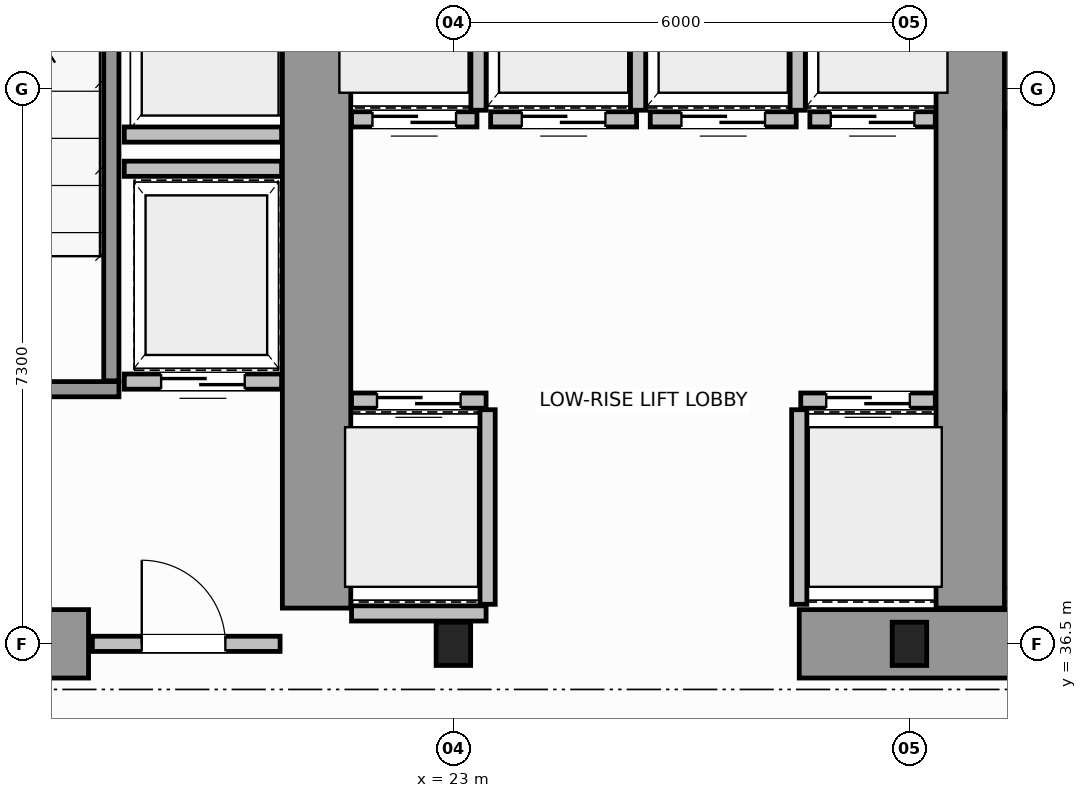
"""IFC4 building model, lengths in metres.
Left out: names, types, materials, properties, quantities, classifications, styles, units other than length and angle.
Written with IfcOpenShell. Run it as: python <this file> out.ifc"""

import sys

from ifc_helpers import new_model, si_unit, direction, frame, frame_2d, origin, origin_2d, place, context, subcontext, project, spatial, rectangle, i_section, extrude, source, transform, mapped, element, fill, save


model = new_model("IFC4")
c1 = context("Model", 3, precision=1e-05, world=origin(), true_north=direction((0.0, 1.0)))
c2 = subcontext(c1, "Body", "Model", "MODEL_VIEW")
j1 = project(units=[si_unit("LENGTHUNIT", "METRE"), si_unit("PLANEANGLEUNIT", "RADIAN")], contexts=[c1])
p1 = place(None, origin())
s1 = spatial("IfcSite", under=j1, at=p1, CompositionType="ELEMENT")
p2 = place(p1, origin())
s2 = spatial("IfcBuilding", under=s1, at=p2, CompositionType="ELEMENT")
p3 = place(p2, frame((0.0, 0.0, 56.8)))
s3 = spatial("IfcBuildingStorey", under=s2, at=p3, CompositionType="ELEMENT", Elevation=56.8)
m1 = source(origin(), c2, "Body", "SweptSolid", [
    extrude(i_section(OverallWidth=0.454, OverallDepth=0.569, WebThickness=0.078, FlangeThickness=0.08, FilletRadius=0.015, at=origin_2d()), origin(), (0.0, 0.0, 1.0), 3.8),
])
for number, where, z_axis, x_axis in (
    (1, (23.0, 36.5, 0.0), (0.0, 0.0, 1.0), (1.0, 0.0, 0.0)),
    (2, (29.0, 36.5, 0.0), (0.0, 0.0, 1.0), (1.0, 0.0, 0.0)),
):
    element("IfcColumn", number, at=place(p3, frame(where, z_axis=z_axis, x_axis=x_axis)), inside=s3, PredefinedType="COLUMN", context=c2, shape_type="MappedRepresentation", body=[
        mapped(m1, transform((0.0, 0.0, 0.0), scale=1.0)),
    ])
p4 = place(p3, frame((14.47, 36.5, 0.0), z_axis=(0.0, 0.0, 1.0), x_axis=(1.0, 0.0, 0.0)))
e3 = element("IfcWall", 3, at=p4, inside=s3, PredefinedType="SHEAR", context=c2, shape_type="SweptSolid", body=[
    extrude(rectangle(XDim=3.73, YDim=0.9, at=frame_2d((1.865, 0.0))), origin(), (0.0, 0.0, 1.0), 2.38),
])
p5 = place(p3, frame((27.55, 36.5, 0.0), z_axis=(0.0, 0.0, 1.0), x_axis=(1.0, 0.0, 0.0)))
e4 = element("IfcWall", 4, at=p5, inside=s3, PredefinedType="SHEAR", context=c2, shape_type="SweptSolid", body=[
    extrude(rectangle(XDim=4.5, YDim=0.9, at=frame_2d((2.25, 0.0))), origin(), (0.0, 0.0, 1.0), 3.8),
])
for number, where, z_axis, x_axis in (
    (5, (21.2, 36.97, 0.0), (0.0, 0.0, 1.0), (0.0, 1.0, 0.0)),
    (6, (29.8, 36.97, 0.0), (0.0, 0.0, 1.0), (0.0, 1.0, 0.0)),
):
    element("IfcWall", number, at=place(p3, frame(where, z_axis=z_axis, x_axis=x_axis)), inside=s3, PredefinedType="SHEAR", context=c2, shape_type="SweptSolid", body=[
        extrude(rectangle(XDim=9.23, YDim=0.9, at=frame_2d((4.615, 0.0))), origin(), (0.0, 0.0, 1.0), 3.8),
    ])
p6 = place(p3, frame((14.45, 39.85, 0.0), z_axis=(0.0, 0.0, 1.0), x_axis=(1.0, 0.0, 0.0)))
e7 = element("IfcWall", 7, at=p6, inside=s3, PredefinedType="SOLIDWALL", context=c2, shape_type="SweptSolid", body=[
    extrude(rectangle(XDim=4.15, YDim=0.2, at=frame_2d((2.075, 0.0))), origin(), (0.0, 0.0, 1.0), 3.8),
])
p7 = place(p6, frame((1.725, 0.0, 0.0)))
e8 = element("IfcOpeningElement", 8, at=p7, cuts=e7, PredefinedType="OPENING", context=c2, shape_type="SweptSolid", body=[
    extrude(rectangle(XDim=1.1, YDim=2.15, at=frame_2d((0.55, 1.075))), frame((0.0, 0.11, 0.0), z_axis=(0.0, -1.0, 0.0), x_axis=(1.0, 0.0, 0.0)), (0.0, 0.0, 1.0), 0.22),
])
p8 = place(p3, frame((18.5, 39.96, 0.0), z_axis=(0.0, 0.0, 1.0), x_axis=(0.0, 1.0, 0.0)))
e9 = element("IfcWall", 9, at=p8, inside=s3, PredefinedType="SOLIDWALL", context=c2, shape_type="SweptSolid", body=[
    extrude(rectangle(XDim=9.93, YDim=0.2, at=frame_2d((4.965, 0.0))), origin(), (0.0, 0.0, 1.0), 3.8),
])
p9 = place(p3, frame((18.25, 36.5, 0.0), z_axis=(0.0, 0.0, 1.0), x_axis=(1.0, 0.0, 0.0)))
e10 = element("IfcWall", 10, at=p9, inside=s3, PredefinedType="SOLIDWALL", context=c2, shape_type="SweptSolid", body=[
    extrude(rectangle(XDim=2.47, YDim=0.2, at=frame_2d((1.235, 0.0))), origin(), (0.0, 0.0, 1.0), 2.37),
])
p10 = place(p9, frame((0.65, 0.0, 0.0)))
e11 = element("IfcOpeningElement", 11, at=p10, cuts=e10, PredefinedType="OPENING", context=c2, shape_type="SweptSolid", body=[
    extrude(rectangle(XDim=1.1, YDim=2.15, at=frame_2d((0.55, 1.075))), frame((0.0, 0.11, 0.0), z_axis=(0.0, -1.0, 0.0), x_axis=(1.0, 0.0, 0.0)), (0.0, 0.0, 1.0), 0.22),
])
p11 = place(p3, frame((21.66, 39.7, 0.0), z_axis=(0.0, 0.0, 1.0), x_axis=(1.0, 0.0, 0.0)))
e12 = element("IfcWall", 12, at=p11, inside=s3, PredefinedType="SOLIDWALL", context=c2, shape_type="SweptSolid", body=[
    extrude(rectangle(XDim=1.77, YDim=0.2, at=frame_2d((0.885, 0.0))), origin(), (0.0, 0.0, 1.0), 3.58),
])
p12 = place(p11, frame((0.335, 0.0, 0.0)))
e13 = element("IfcOpeningElement", 13, at=p12, cuts=e12, PredefinedType="OPENING", context=c2, shape_type="SweptSolid", body=[
    extrude(rectangle(XDim=1.1, YDim=2.15, at=frame_2d((0.55, 1.075))), frame((0.0, 0.11, 0.0), z_axis=(0.0, -1.0, 0.0), x_axis=(1.0, 0.0, 0.0)), (0.0, 0.0, 1.0), 0.22),
])
p13 = place(p3, frame((21.66, 36.9, 0.0), z_axis=(0.0, 0.0, 1.0), x_axis=(1.0, 0.0, 0.0)))
e14 = element("IfcWall", 14, at=p13, inside=s3, PredefinedType="SOLIDWALL", context=c2, shape_type="SweptSolid", body=[
    extrude(rectangle(XDim=1.77, YDim=0.2, at=frame_2d((0.885, 0.0))), origin(), (0.0, 0.0, 1.0), 2.37),
])
p14 = place(p3, frame((23.45, 37.02, 0.0), z_axis=(0.0, 0.0, 1.0), x_axis=(0.0, 1.0, 0.0)))
e15 = element("IfcWall", 15, at=p14, inside=s3, PredefinedType="SOLIDWALL", context=c2, shape_type="SweptSolid", body=[
    extrude(rectangle(XDim=2.56, YDim=0.2, at=frame_2d((1.28, 0.0))), origin(), (0.0, 0.0, 1.0), 3.58),
])
p15 = place(p3, frame((27.57, 39.7, 0.0), z_axis=(0.0, 0.0, 1.0), x_axis=(1.0, 0.0, 0.0)))
e16 = element("IfcWall", 16, at=p15, inside=s3, PredefinedType="SOLIDWALL", context=c2, shape_type="SweptSolid", body=[
    extrude(rectangle(XDim=1.77, YDim=0.2, at=frame_2d((0.885, 0.0))), origin(), (0.0, 0.0, 1.0), 3.58),
])
p16 = place(p15, frame((0.335, 0.0, 0.0)))
e17 = element("IfcOpeningElement", 17, at=p16, cuts=e16, PredefinedType="OPENING", context=c2, shape_type="SweptSolid", body=[
    extrude(rectangle(XDim=1.1, YDim=2.15, at=frame_2d((0.55, 1.075))), frame((0.0, 0.11, 0.0), z_axis=(0.0, -1.0, 0.0), x_axis=(1.0, 0.0, 0.0)), (0.0, 0.0, 1.0), 0.22),
])
p17 = place(p3, frame((27.55, 37.02, 0.0), z_axis=(0.0, 0.0, 1.0), x_axis=(0.0, 1.0, 0.0)))
e18 = element("IfcWall", 18, at=p17, inside=s3, PredefinedType="SOLIDWALL", context=c2, shape_type="SweptSolid", body=[
    extrude(rectangle(XDim=2.56, YDim=0.2, at=frame_2d((1.28, 0.0))), origin(), (0.0, 0.0, 1.0), 3.58),
])
p18 = place(p3, frame((21.66, 43.4, 0.0), z_axis=(0.0, 0.0, 1.0), x_axis=(1.0, 0.0, 0.0)))
e19 = element("IfcWall", 19, at=p18, inside=s3, PredefinedType="SOLIDWALL", context=c2, shape_type="SweptSolid", body=[
    extrude(rectangle(XDim=1.65, YDim=0.2, at=frame_2d((0.825, 0.0))), origin(), (0.0, 0.0, 1.0), 3.58),
])
p19 = place(p18, frame((0.275, 0.0, 0.0)))
e20 = element("IfcOpeningElement", 20, at=p19, cuts=e19, PredefinedType="OPENING", context=c2, shape_type="SweptSolid", body=[
    extrude(rectangle(XDim=1.1, YDim=2.15, at=frame_2d((0.55, 1.075))), frame((0.0, 0.11, 0.0), z_axis=(0.0, -1.0, 0.0), x_axis=(1.0, 0.0, 0.0)), (0.0, 0.0, 1.0), 0.22),
])
p20 = place(p3, frame((23.33, 43.52, 0.0), z_axis=(0.0, 0.0, 1.0), x_axis=(0.0, 1.0, 0.0)))
e21 = element("IfcWall", 21, at=p20, inside=s3, PredefinedType="SOLIDWALL", context=c2, shape_type="SweptSolid", body=[
    extrude(rectangle(XDim=2.56, YDim=0.2, at=frame_2d((1.28, 0.0))), origin(), (0.0, 0.0, 1.0), 3.58),
])
p21 = place(p3, frame((23.49, 43.4, 0.0), z_axis=(0.0, 0.0, 1.0), x_axis=(1.0, 0.0, 0.0)))
e22 = element("IfcWall", 22, at=p21, inside=s3, PredefinedType="SOLIDWALL", context=c2, shape_type="SweptSolid", body=[
    extrude(rectangle(XDim=1.92, YDim=0.2, at=frame_2d((0.96, 0.0))), origin(), (0.0, 0.0, 1.0), 3.58),
])
p22 = place(p21, frame((0.41, 0.0, 0.0)))
e23 = element("IfcOpeningElement", 23, at=p22, cuts=e22, PredefinedType="OPENING", context=c2, shape_type="SweptSolid", body=[
    extrude(rectangle(XDim=1.1, YDim=2.15, at=frame_2d((0.55, 1.075))), frame((0.0, 0.11, 0.0), z_axis=(0.0, -1.0, 0.0), x_axis=(1.0, 0.0, 0.0)), (0.0, 0.0, 1.0), 0.22),
])
p23 = place(p3, frame((25.43, 43.52, 0.0), z_axis=(0.0, 0.0, 1.0), x_axis=(0.0, 1.0, 0.0)))
e24 = element("IfcWall", 24, at=p23, inside=s3, PredefinedType="SOLIDWALL", context=c2, shape_type="SweptSolid", body=[
    extrude(rectangle(XDim=2.56, YDim=0.2, at=frame_2d((1.28, 0.0))), origin(), (0.0, 0.0, 1.0), 3.58),
])
p24 = place(p3, frame((25.59, 43.4, 0.0), z_axis=(0.0, 0.0, 1.0), x_axis=(1.0, 0.0, 0.0)))
e25 = element("IfcWall", 25, at=p24, inside=s3, PredefinedType="SOLIDWALL", context=c2, shape_type="SweptSolid", body=[
    extrude(rectangle(XDim=1.92, YDim=0.2, at=frame_2d((0.96, 0.0))), origin(), (0.0, 0.0, 1.0), 3.58),
])
p25 = place(p24, frame((0.41, 0.0, 0.0)))
e26 = element("IfcOpeningElement", 26, at=p25, cuts=e25, PredefinedType="OPENING", context=c2, shape_type="SweptSolid", body=[
    extrude(rectangle(XDim=1.1, YDim=2.15, at=frame_2d((0.55, 1.075))), frame((0.0, 0.11, 0.0), z_axis=(0.0, -1.0, 0.0), x_axis=(1.0, 0.0, 0.0)), (0.0, 0.0, 1.0), 0.22),
])
p26 = place(p3, frame((27.53, 43.52, 0.0), z_axis=(0.0, 0.0, 1.0), x_axis=(0.0, 1.0, 0.0)))
e27 = element("IfcWall", 27, at=p26, inside=s3, PredefinedType="SOLIDWALL", context=c2, shape_type="SweptSolid", body=[
    extrude(rectangle(XDim=2.56, YDim=0.2, at=frame_2d((1.28, 0.0))), origin(), (0.0, 0.0, 1.0), 3.58),
])
p27 = place(p3, frame((27.69, 43.4, 0.0), z_axis=(0.0, 0.0, 1.0), x_axis=(1.0, 0.0, 0.0)))
e28 = element("IfcWall", 28, at=p27, inside=s3, PredefinedType="SOLIDWALL", context=c2, shape_type="SweptSolid", body=[
    extrude(rectangle(XDim=1.65, YDim=0.2, at=frame_2d((0.825, 0.0))), origin(), (0.0, 0.0, 1.0), 3.58),
])
p28 = place(p27, frame((0.275, 0.0, 0.0)))
e29 = element("IfcOpeningElement", 29, at=p28, cuts=e28, PredefinedType="OPENING", context=c2, shape_type="SweptSolid", body=[
    extrude(rectangle(XDim=1.1, YDim=2.15, at=frame_2d((0.55, 1.075))), frame((0.0, 0.11, 0.0), z_axis=(0.0, -1.0, 0.0), x_axis=(1.0, 0.0, 0.0)), (0.0, 0.0, 1.0), 0.22),
])
p29 = place(p3, frame((30.26, 39.7, 0.0), z_axis=(0.0, 0.0, 1.0), x_axis=(1.0, 0.0, 0.0)))
e30 = element("IfcWall", 30, at=p29, inside=s3, PredefinedType="SOLIDWALL", context=c2, shape_type="SweptSolid", body=[
    extrude(rectangle(XDim=1.77, YDim=0.2, at=frame_2d((0.885, 0.0))), origin(), (0.0, 0.0, 1.0), 3.58),
])
p30 = place(p3, frame((30.26, 43.4, 0.0), z_axis=(0.0, 0.0, 1.0), x_axis=(1.0, 0.0, 0.0)))
e31 = element("IfcWall", 31, at=p30, inside=s3, PredefinedType="SOLIDWALL", context=c2, shape_type="SweptSolid", body=[
    extrude(rectangle(XDim=1.65, YDim=0.2, at=frame_2d((0.825, 0.0))), origin(), (0.0, 0.0, 1.0), 3.58),
])
p31 = place(p3, frame((18.67, 43.2, 0.0), z_axis=(0.0, 0.0, 1.0), x_axis=(1.0, 0.0, 0.0)))
e32 = element("IfcWall", 32, at=p31, inside=s3, PredefinedType="SOLIDWALL", context=c2, shape_type="SweptSolid", body=[
    extrude(rectangle(XDim=2.07, YDim=0.2, at=frame_2d((1.035, 0.0))), origin(), (0.0, 0.0, 1.0), 3.58),
])
p32 = place(p3, frame((18.67, 39.95, 0.0), z_axis=(0.0, 0.0, 1.0), x_axis=(1.0, 0.0, 0.0)))
e33 = element("IfcWall", 33, at=p32, inside=s3, PredefinedType="SOLIDWALL", context=c2, shape_type="SweptSolid", body=[
    extrude(rectangle(XDim=2.07, YDim=0.2, at=frame_2d((1.035, 0.0))), origin(), (0.0, 0.0, 1.0), 3.58),
])
p33 = place(p32, frame((0.485, 0.0, 0.0)))
e34 = element("IfcOpeningElement", 34, at=p33, cuts=e33, PredefinedType="OPENING", context=c2, shape_type="SweptSolid", body=[
    extrude(rectangle(XDim=1.1, YDim=2.15, at=frame_2d((0.55, 1.075))), frame((0.0, 0.11, 0.0), z_axis=(0.0, -1.0, 0.0), x_axis=(1.0, 0.0, 0.0)), (0.0, 0.0, 1.0), 0.22),
])
p34 = place(p3, frame((18.67, 42.75, 0.0), z_axis=(0.0, 0.0, 1.0), x_axis=(1.0, 0.0, 0.0)))
e35 = element("IfcWall", 35, at=p34, inside=s3, PredefinedType="SOLIDWALL", context=c2, shape_type="SweptSolid", body=[
    extrude(rectangle(XDim=2.07, YDim=0.2, at=frame_2d((1.035, 0.0))), origin(), (0.0, 0.0, 1.0), 3.58),
])
m2 = source(origin(), c2, "Body", "SweptSolid", [
    extrude(rectangle(XDim=1.1, YDim=2.15, at=frame_2d((0.55, 1.075))), frame((0.0, 0.025, 0.0), z_axis=(0.0, -1.0, 0.0), x_axis=(1.0, 0.0, 0.0)), (0.0, 0.0, 1.0), 0.05),
])
p35 = place(p10, origin())
e36 = element("IfcDoor", 36, at=p35, inside=s3, OperationType="SINGLE_SWING_RIGHT", PredefinedType="DOOR", context=c2, shape_type="MappedRepresentation", body=[
    mapped(m2, transform((0.0, 0.0, 0.0), scale=1.0)),
])
fill(e11, e36)
p36 = place(p12, origin())
e37 = element("IfcDoor", 37, at=p36, inside=s3, OperationType="DOUBLE_DOOR_SLIDING", PredefinedType="DOOR", context=c2, shape_type="MappedRepresentation", body=[
    mapped(m2, transform((0.0, 0.0, 0.0), scale=1.0)),
])
fill(e13, e37)
p37 = place(p16, origin())
e38 = element("IfcDoor", 38, at=p37, inside=s3, OperationType="DOUBLE_DOOR_SLIDING", PredefinedType="DOOR", context=c2, shape_type="MappedRepresentation", body=[
    mapped(m2, transform((0.0, 0.0, 0.0), scale=1.0)),
])
fill(e17, e38)
p38 = place(p19, origin())
e39 = element("IfcDoor", 39, at=p38, inside=s3, OperationType="DOUBLE_DOOR_SLIDING", PredefinedType="DOOR", context=c2, shape_type="MappedRepresentation", body=[
    mapped(m2, transform((0.0, 0.0, 0.0), scale=1.0)),
])
fill(e20, e39)
p39 = place(p22, origin())
e40 = element("IfcDoor", 40, at=p39, inside=s3, OperationType="DOUBLE_DOOR_SLIDING", PredefinedType="DOOR", context=c2, shape_type="MappedRepresentation", body=[
    mapped(m2, transform((0.0, 0.0, 0.0), scale=1.0)),
])
fill(e23, e40)
p40 = place(p25, origin())
e41 = element("IfcDoor", 41, at=p40, inside=s3, OperationType="DOUBLE_DOOR_SLIDING", PredefinedType="DOOR", context=c2, shape_type="MappedRepresentation", body=[
    mapped(m2, transform((0.0, 0.0, 0.0), scale=1.0)),
])
fill(e26, e41)
p41 = place(p28, origin())
e42 = element("IfcDoor", 42, at=p41, inside=s3, OperationType="DOUBLE_DOOR_SLIDING", PredefinedType="DOOR", context=c2, shape_type="MappedRepresentation", body=[
    mapped(m2, transform((0.0, 0.0, 0.0), scale=1.0)),
])
fill(e29, e42)
p42 = place(p33, origin())
e43 = element("IfcDoor", 43, at=p42, inside=s3, OperationType="DOUBLE_DOOR_SLIDING", PredefinedType="DOOR", context=c2, shape_type="MappedRepresentation", body=[
    mapped(m2, transform((0.0, 0.0, 0.0), scale=1.0)),
])
fill(e34, e43)
save(model, sys.argv[1])
